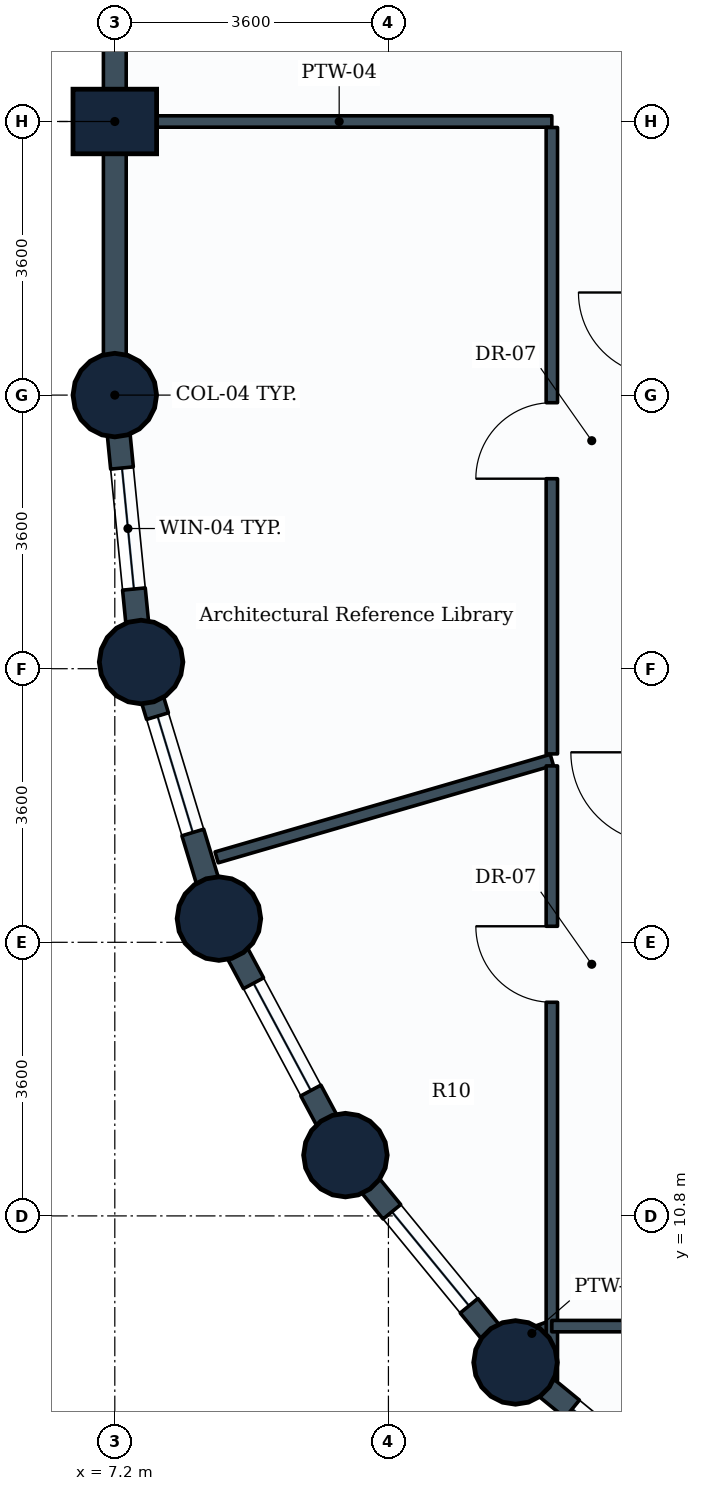
"""IFC4 building model, lengths in metres.
Left out: names, types, materials, properties, quantities, classifications, styles, units other than length and angle.
Written with IfcOpenShell. Run it as: python <this file> out.ifc"""

import sys

from ifc_helpers import new_model, si_unit, direction, frame, frame_2d, origin, origin_2d, place, context, subcontext, project, spatial, rectangle, circle, extrude, element, fill, save


model = new_model("IFC4")
c1 = context("Model", 3, precision=1e-05, world=origin(), true_north=direction((0.0, 1.0)))
c2 = subcontext(c1, "Body", "Model", "MODEL_VIEW")
j1 = project(units=[si_unit("LENGTHUNIT", "METRE"), si_unit("PLANEANGLEUNIT", "RADIAN")], contexts=[c1])
p1 = place(None, origin())
s1 = spatial("IfcSite", under=j1, at=p1, CompositionType="ELEMENT")
p2 = place(p1, origin())
s2 = spatial("IfcBuilding", under=s1, at=p2, CompositionType="ELEMENT")
p3 = place(p2, frame((0.0, 0.0, 91.8)))
s3 = spatial("IfcBuildingStorey", under=s2, at=p3, CompositionType="ELEMENT", Elevation=91.8)
p4 = place(p3, frame((7.2, 21.6, 0.0), z_axis=(0.0, 0.0, 1.0), x_axis=(1.0, 0.0, 0.0)))
e1 = element("IfcColumn", 1, at=p4, inside=s3, PredefinedType="COLUMN", context=c2, shape_type="SweptSolid", body=[
    extrude(circle(Radius=0.55, at=origin_2d()), origin(), (0.0, 0.0, 1.0), 3.9),
])
p5 = place(p3, frame((7.2, 25.2, 0.0), z_axis=(0.0, 0.0, 1.0), x_axis=(0.0, 1.0, 0.0)))
e2 = element("IfcColumn", 2, at=p5, inside=s3, PredefinedType="COLUMN", context=c2, shape_type="SweptSolid", body=[
    extrude(rectangle(XDim=0.85, YDim=1.1, at=origin_2d()), origin(), (0.0, 0.0, 1.0), 3.9),
])
for number, where, z_axis, x_axis in (
    (3, (7.546, 18.088, 0.0), (0.0, 0.0, 1.0), (1.0, 0.0, 0.0)),
    (4, (8.57, 14.712, 0.0), (0.0, 0.0, 1.0), (1.0, 0.0, 0.0)),
    (5, (10.234, 11.6, 0.0), (0.0, 0.0, 1.0), (1.0, 0.0, 0.0)),
    (6, (12.472, 8.872, 0.0), (0.0, 0.0, 1.0), (1.0, 0.0, 0.0)),
):
    element("IfcColumn", number, at=place(p3, frame(where, z_axis=z_axis, x_axis=x_axis)), inside=s3, PredefinedType="COLUMN", context=c2, shape_type="SweptSolid", body=[
        extrude(circle(Radius=0.55, at=origin_2d()), origin(), (0.0, 0.0, 1.0), 3.9),
    ])
p6 = place(p3, frame((7.2, 25.2, 0.0), z_axis=(0.0, 0.0, 1.0), x_axis=(0.0, 1.0, 0.0)))
e7 = element("IfcWall", 7, at=p6, inside=s3, PredefinedType="STANDARD", context=c2, shape_type="SweptSolid", body=[
    extrude(rectangle(XDim=3.6, YDim=0.3, at=frame_2d((1.8, 0.0))), origin(), (0.0, 0.0, 1.0), 2.93),
])
p7 = place(p3, frame((7.2, 21.6, 0.0), z_axis=(0.0, 0.0, 1.0), x_axis=(0.0, 1.0, 0.0)))
e8 = element("IfcWall", 8, at=p7, inside=s3, PredefinedType="STANDARD", context=c2, shape_type="SweptSolid", body=[
    extrude(rectangle(XDim=3.6, YDim=0.3, at=frame_2d((1.8, 0.0))), origin(), (0.0, 0.0, 1.0), 2.93),
])
p8 = place(p3, frame((7.546, 18.088, 0.0), z_axis=(0.0, 0.0, 1.0), x_axis=(-0.09802417461, 0.995184033831, 0.0)))
e9 = element("IfcWall", 9, at=p8, inside=s3, PredefinedType="STANDARD", context=c2, shape_type="SweptSolid", body=[
    extrude(rectangle(XDim=3.529, YDim=0.3, at=frame_2d((1.765, 0.0))), origin(), (0.0, 0.0, 1.0), 2.93),
])
p9 = place(p8, frame((0.965, 0.0, 0.85)))
e10 = element("IfcOpeningElement", 10, at=p9, cuts=e9, PredefinedType="OPENING", context=c2, shape_type="SweptSolid", body=[
    extrude(rectangle(XDim=1.6, YDim=1.35, at=frame_2d((0.8, 0.675))), frame((0.0, 0.16, 0.0), z_axis=(0.0, -1.0, 0.0), x_axis=(1.0, 0.0, 0.0)), (0.0, 0.0, 1.0), 0.32),
])
p10 = place(p3, frame((8.57, 14.712, 0.0), z_axis=(0.0, 0.0, 1.0), x_axis=(-0.290305086481, 0.956934144423, 0.0)))
e11 = element("IfcWall", 11, at=p10, inside=s3, PredefinedType="STANDARD", context=c2, shape_type="SweptSolid", body=[
    extrude(rectangle(XDim=3.528, YDim=0.3, at=frame_2d((1.764, 0.0))), origin(), (0.0, 0.0, 1.0), 2.93),
])
p11 = place(p10, frame((1.184, 0.0, 0.85)))
e12 = element("IfcOpeningElement", 12, at=p11, cuts=e11, PredefinedType="OPENING", context=c2, shape_type="SweptSolid", body=[
    extrude(rectangle(XDim=1.6, YDim=1.35, at=frame_2d((0.8, 0.675))), frame((0.0, 0.16, 0.0), z_axis=(0.0, -1.0, 0.0), x_axis=(1.0, 0.0, 0.0)), (0.0, 0.0, 1.0), 0.32),
])
p12 = place(p3, frame((10.234, 11.6, 0.0), z_axis=(0.0, 0.0, 1.0), x_axis=(-0.47151087309, 0.881860247748, 0.0)))
e13 = element("IfcWall", 13, at=p12, inside=s3, PredefinedType="STANDARD", context=c2, shape_type="SweptSolid", body=[
    extrude(rectangle(XDim=3.529, YDim=0.3, at=frame_2d((1.764, 0.0))), origin(), (0.0, 0.0, 1.0), 2.93),
])
p13 = place(p12, frame((0.964, 0.0, 0.85)))
e14 = element("IfcOpeningElement", 14, at=p13, cuts=e13, PredefinedType="OPENING", context=c2, shape_type="SweptSolid", body=[
    extrude(rectangle(XDim=1.6, YDim=1.35, at=frame_2d((0.8, 0.675))), frame((0.0, 0.16, 0.0), z_axis=(0.0, -1.0, 0.0), x_axis=(1.0, 0.0, 0.0)), (0.0, 0.0, 1.0), 0.32),
])
p14 = place(p3, frame((12.472, 8.872, 0.0), z_axis=(0.0, 0.0, 1.0), x_axis=(-0.634258295121, 0.773121216285, 0.0)))
e15 = element("IfcWall", 15, at=p14, inside=s3, PredefinedType="STANDARD", context=c2, shape_type="SweptSolid", body=[
    extrude(rectangle(XDim=3.529, YDim=0.3, at=frame_2d((1.764, 0.0))), origin(), (0.0, 0.0, 1.0), 2.93),
])
p15 = place(p14, frame((0.964, 0.0, 0.85)))
e16 = element("IfcOpeningElement", 16, at=p15, cuts=e15, PredefinedType="OPENING", context=c2, shape_type="SweptSolid", body=[
    extrude(rectangle(XDim=1.6, YDim=1.35, at=frame_2d((0.8, 0.675))), frame((0.0, 0.16, 0.0), z_axis=(0.0, -1.0, 0.0), x_axis=(1.0, 0.0, 0.0)), (0.0, 0.0, 1.0), 0.32),
])
p16 = place(p3, frame((15.2, 6.634, 0.0), z_axis=(0.0, 0.0, 1.0), x_axis=(-0.773121216285, 0.634258295121, 0.0)))
e17 = element("IfcWall", 17, at=p16, inside=s3, PredefinedType="STANDARD", context=c2, shape_type="SweptSolid", body=[
    extrude(rectangle(XDim=3.529, YDim=0.3, at=frame_2d((1.764, 0.0))), origin(), (0.0, 0.0, 1.0), 2.93),
])
p17 = place(p16, frame((0.964, 0.0, 0.85)))
e18 = element("IfcOpeningElement", 18, at=p17, cuts=e17, PredefinedType="OPENING", context=c2, shape_type="SweptSolid", body=[
    extrude(rectangle(XDim=1.6, YDim=1.35, at=frame_2d((0.8, 0.675))), frame((0.0, 0.16, 0.0), z_axis=(0.0, -1.0, 0.0), x_axis=(1.0, 0.0, 0.0)), (0.0, 0.0, 1.0), 0.32),
])
p18 = place(p3, frame((7.354, 25.2, 0.0), z_axis=(0.0, 0.0, 1.0), x_axis=(1.0, 0.0, 0.0)))
e19 = element("IfcWall", 19, at=p18, inside=s3, PredefinedType="PARTITIONING", context=c2, shape_type="SweptSolid", body=[
    extrude(rectangle(XDim=5.596, YDim=0.15, at=frame_2d((2.798, 0.0))), origin(), (0.0, 0.0, 1.0), 3.635),
])
p19 = place(p3, frame((12.95, 16.8, 0.0), z_axis=(0.0, 0.0, 1.0), x_axis=(-0.960237798553, -0.279183398915, 0.0)))
e20 = element("IfcWall", 20, at=p19, inside=s3, PredefinedType="PARTITIONING", context=c2, shape_type="SweptSolid", body=[
    extrude(rectangle(XDim=4.593, YDim=0.15, at=frame_2d((2.296, 0.0))), origin(), (0.0, 0.0, 1.0), 2.93),
])
p20 = place(p3, frame((12.95, 9.35, 0.0), z_axis=(0.0, 0.0, 1.0), x_axis=(-0.939538101119, -0.342444384601, 0.0)))
e21 = element("IfcWall", 21, at=p20, inside=s3, PredefinedType="PARTITIONING", context=c2, shape_type="SweptSolid", body=[
    extrude(rectangle(XDim=0.559, YDim=0.15, at=frame_2d((0.279, 0.0))), origin(), (0.0, 0.0, 1.0), 2.93),
])
p21 = place(p3, frame((12.95, 16.879, 0.0), z_axis=(0.0, 0.0, 1.0), x_axis=(0.0, 1.0, 0.0)))
e22 = element("IfcWall", 22, at=p21, inside=s3, PredefinedType="PARTITIONING", context=c2, shape_type="SweptSolid", body=[
    extrude(rectangle(XDim=8.242, YDim=0.15, at=frame_2d((4.121, 0.0))), origin(), (0.0, 0.0, 1.0), 3.19),
])
p22 = place(p21, frame((3.621, 0.0, 0.0)))
e23 = element("IfcOpeningElement", 23, at=p22, cuts=e22, PredefinedType="OPENING", context=c2, shape_type="SweptSolid", body=[
    extrude(rectangle(XDim=1.0, YDim=2.1, at=frame_2d((0.5, 1.05))), frame((0.0, 0.085, 0.0), z_axis=(0.0, -1.0, 0.0), x_axis=(1.0, 0.0, 0.0)), (0.0, 0.0, 1.0), 0.17),
])
p23 = place(p3, frame((12.95, 8.634, 0.0), z_axis=(0.0, 0.0, 1.0), x_axis=(0.0, 1.0, 0.0)))
e24 = element("IfcWall", 24, at=p23, inside=s3, PredefinedType="PARTITIONING", context=c2, shape_type="SweptSolid", body=[
    extrude(rectangle(XDim=8.087, YDim=0.15, at=frame_2d((4.043, 0.0))), origin(), (0.0, 0.0, 1.0), 2.93),
])
p24 = place(p23, frame((4.977, 0.0, 0.0)))
e25 = element("IfcOpeningElement", 25, at=p24, cuts=e24, PredefinedType="OPENING", context=c2, shape_type="SweptSolid", body=[
    extrude(rectangle(XDim=1.0, YDim=2.1, at=frame_2d((0.5, 1.05))), frame((0.0, 0.085, 0.0), z_axis=(0.0, -1.0, 0.0), x_axis=(1.0, 0.0, 0.0)), (0.0, 0.0, 1.0), 0.17),
])
p25 = place(p3, frame((12.95, 9.35, 0.0), z_axis=(0.0, 0.0, 1.0), x_axis=(1.0, 0.0, 0.0)))
e26 = element("IfcWall", 26, at=p25, inside=s3, PredefinedType="PARTITIONING", context=c2, shape_type="SweptSolid", body=[
    extrude(rectangle(XDim=7.371, YDim=0.15, at=frame_2d((3.686, 0.0))), origin(), (0.0, 0.0, 1.0), 3.19),
])
p26 = place(p25, frame((4.261, 0.0, 0.0)))
e27 = element("IfcOpeningElement", 27, at=p26, cuts=e26, PredefinedType="OPENING", context=c2, shape_type="SweptSolid", body=[
    extrude(rectangle(XDim=1.0, YDim=2.1, at=frame_2d((0.5, 1.05))), frame((0.0, 0.085, 0.0), z_axis=(0.0, -1.0, 0.0), x_axis=(1.0, 0.0, 0.0)), (0.0, 0.0, 1.0), 0.17),
])
p27 = place(p9, origin())
e28 = element("IfcWindow", 28, at=p27, inside=s3, PartitioningType="SINGLE_PANEL", PredefinedType="WINDOW", context=c2, shape_type="SweptSolid", body=[
    extrude(rectangle(XDim=1.6, YDim=1.35, at=frame_2d((0.8, 0.675))), frame((0.0, 0.03, 0.0), z_axis=(0.0, -1.0, 0.0), x_axis=(1.0, 0.0, 0.0)), (0.0, 0.0, 1.0), 0.06),
])
fill(e10, e28)
p28 = place(p11, origin())
e29 = element("IfcWindow", 29, at=p28, inside=s3, PartitioningType="SINGLE_PANEL", PredefinedType="WINDOW", context=c2, shape_type="SweptSolid", body=[
    extrude(rectangle(XDim=1.6, YDim=1.35, at=frame_2d((0.8, 0.675))), frame((0.0, 0.03, 0.0), z_axis=(0.0, -1.0, 0.0), x_axis=(1.0, 0.0, 0.0)), (0.0, 0.0, 1.0), 0.06),
])
fill(e12, e29)
p29 = place(p13, origin())
e30 = element("IfcWindow", 30, at=p29, inside=s3, PartitioningType="SINGLE_PANEL", PredefinedType="WINDOW", context=c2, shape_type="SweptSolid", body=[
    extrude(rectangle(XDim=1.6, YDim=1.35, at=frame_2d((0.8, 0.675))), frame((0.0, 0.03, 0.0), z_axis=(0.0, -1.0, 0.0), x_axis=(1.0, 0.0, 0.0)), (0.0, 0.0, 1.0), 0.06),
])
fill(e14, e30)
p30 = place(p15, origin())
e31 = element("IfcWindow", 31, at=p30, inside=s3, PartitioningType="SINGLE_PANEL", PredefinedType="WINDOW", context=c2, shape_type="SweptSolid", body=[
    extrude(rectangle(XDim=1.6, YDim=1.35, at=frame_2d((0.8, 0.675))), frame((0.0, 0.03, 0.0), z_axis=(0.0, -1.0, 0.0), x_axis=(1.0, 0.0, 0.0)), (0.0, 0.0, 1.0), 0.06),
])
fill(e16, e31)
p31 = place(p17, origin())
e32 = element("IfcWindow", 32, at=p31, inside=s3, PartitioningType="SINGLE_PANEL", PredefinedType="WINDOW", context=c2, shape_type="SweptSolid", body=[
    extrude(rectangle(XDim=1.6, YDim=1.35, at=frame_2d((0.8, 0.675))), frame((0.0, 0.03, 0.0), z_axis=(0.0, -1.0, 0.0), x_axis=(1.0, 0.0, 0.0)), (0.0, 0.0, 1.0), 0.06),
])
fill(e18, e32)
p32 = place(p22, origin())
e33 = element("IfcDoor", 33, at=p32, inside=s3, OperationType="SINGLE_SWING_LEFT", PredefinedType="DOOR", context=c2, shape_type="SweptSolid", body=[
    extrude(rectangle(XDim=1.0, YDim=2.1, at=frame_2d((0.5, 1.05))), frame((0.0, 0.025, 0.0), z_axis=(0.0, -1.0, 0.0), x_axis=(1.0, 0.0, 0.0)), (0.0, 0.0, 1.0), 0.05),
])
fill(e23, e33)
p33 = place(p24, origin())
e34 = element("IfcDoor", 34, at=p33, inside=s3, OperationType="SINGLE_SWING_RIGHT", PredefinedType="DOOR", context=c2, shape_type="SweptSolid", body=[
    extrude(rectangle(XDim=1.0, YDim=2.1, at=frame_2d((0.5, 1.05))), frame((0.0, 0.025, 0.0), z_axis=(0.0, -1.0, 0.0), x_axis=(1.0, 0.0, 0.0)), (0.0, 0.0, 1.0), 0.05),
])
fill(e25, e34)
save(model, sys.argv[1])
